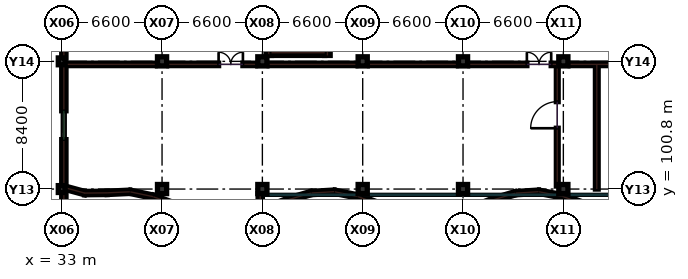
"""IFC4 building model, lengths in metres.
Left out: names, types, materials, properties, quantities, classifications, styles, units other than length and angle.
Written with IfcOpenShell. Run it as: python <this file> out.ifc"""

import sys

from ifc_helpers import new_model, si_unit, direction, frame, frame_2d, origin, origin_2d, place, context, subcontext, project, spatial, rectangle, extrude, element, fill, save


model = new_model("IFC4")
c1 = context("Model", 3, precision=1e-05, world=origin(), true_north=direction((0.0, 1.0)))
c2 = subcontext(c1, "Body", "Model", "MODEL_VIEW")
j1 = project(units=[si_unit("LENGTHUNIT", "METRE"), si_unit("PLANEANGLEUNIT", "RADIAN")], contexts=[c1])
p1 = place(None, origin())
s1 = spatial("IfcSite", under=j1, at=p1, CompositionType="ELEMENT")
p2 = place(p1, origin())
s2 = spatial("IfcBuilding", under=s1, at=p2, CompositionType="ELEMENT")
p3 = place(p2, frame((0.0, 0.0, 14.4)))
s3 = spatial("IfcBuildingStorey", under=s2, at=p3, CompositionType="ELEMENT", Elevation=14.4)
for number, where, z_axis, x_axis in (
    (1, (33.0, 100.8, 0.0), (0.0, 0.0, 1.0), (1.0, 0.0, 0.0)),
    (2, (33.0, 109.2, 0.0), (0.0, 0.0, 1.0), (1.0, 0.0, 0.0)),
):
    element("IfcColumn", number, at=place(p3, frame(where, z_axis=z_axis, x_axis=x_axis)), inside=s3, PredefinedType="COLUMN", context=c2, shape_type="SweptSolid", body=[
        extrude(rectangle(XDim=0.45, YDim=0.45, at=origin_2d()), origin(), (0.0, 0.0, 1.0), 4.2),
    ])
for number, where, z_axis, x_axis in (
    (3, (39.6, 100.8, 0.0), (0.0, 0.0, 1.0), (1.0, 0.0, 0.0)),
    (4, (39.6, 109.2, 0.0), (0.0, 0.0, 1.0), (1.0, 0.0, 0.0)),
    (5, (46.2, 100.8, 0.0), (0.0, 0.0, 1.0), (1.0, 0.0, 0.0)),
    (6, (46.2, 109.2, 0.0), (0.0, 0.0, 1.0), (1.0, 0.0, 0.0)),
    (7, (52.8, 100.8, 0.0), (0.0, 0.0, 1.0), (1.0, 0.0, 0.0)),
    (8, (52.8, 109.2, 0.0), (0.0, 0.0, 1.0), (1.0, 0.0, 0.0)),
    (9, (59.4, 100.8, 0.0), (0.0, 0.0, 1.0), (1.0, 0.0, 0.0)),
    (10, (59.4, 109.2, 0.0), (0.0, 0.0, 1.0), (1.0, 0.0, 0.0)),
    (11, (66.0, 100.8, 0.0), (0.0, 0.0, 1.0), (1.0, 0.0, 0.0)),
    (12, (66.0, 109.2, 0.0), (0.0, 0.0, 1.0), (1.0, 0.0, 0.0)),
):
    element("IfcColumn", number, at=place(p3, frame(where, z_axis=z_axis, x_axis=x_axis)), inside=s3, PredefinedType="COLUMN", context=c2, shape_type="SweptSolid", body=[
        extrude(rectangle(XDim=0.6, YDim=0.6, at=origin_2d()), origin(), (0.0, 0.0, 1.0), 4.2),
    ])
p4 = place(p3, frame((33.32, 109.0, 0.0), z_axis=(0.0, 0.0, 1.0), x_axis=(1.0, 0.0, 0.0)))
e13 = element("IfcWall", 13, at=p4, inside=s3, PredefinedType="PARTITIONING", context=c2, shape_type="SweptSolid", body=[
    extrude(rectangle(XDim=5.83, YDim=0.16, at=frame_2d((2.915, 0.0))), origin(), (0.0, 0.0, 1.0), 3.175),
])
p5 = place(p3, frame((40.05, 109.0, 0.0), z_axis=(0.0, 0.0, 1.0), x_axis=(1.0, 0.0, 0.0)))
e14 = element("IfcWall", 14, at=p5, inside=s3, PredefinedType="PARTITIONING", context=c2, shape_type="SweptSolid", body=[
    extrude(rectangle(XDim=5.7, YDim=0.16, at=frame_2d((2.85, 0.0))), origin(), (0.0, 0.0, 1.0), 3.175),
])
p6 = place(p5, frame((3.27, 0.0, 0.0)))
e15 = element("IfcOpeningElement", 15, at=p6, cuts=e14, PredefinedType="OPENING", context=c2, shape_type="SweptSolid", body=[
    extrude(rectangle(XDim=1.6, YDim=2.2, at=frame_2d((0.8, 1.1))), frame((0.0, 0.09, 0.0), z_axis=(0.0, -1.0, 0.0), x_axis=(1.0, 0.0, 0.0)), (0.0, 0.0, 1.0), 0.18),
])
p7 = place(p3, frame((46.65, 109.0, 0.0), z_axis=(0.0, 0.0, 1.0), x_axis=(1.0, 0.0, 0.0)))
e16 = element("IfcWall", 16, at=p7, inside=s3, PredefinedType="PARTITIONING", context=c2, shape_type="SweptSolid", body=[
    extrude(rectangle(XDim=5.7, YDim=0.16, at=frame_2d((2.85, 0.0))), origin(), (0.0, 0.0, 1.0), 3.175),
])
p8 = place(p3, frame((53.25, 109.0, 0.0), z_axis=(0.0, 0.0, 1.0), x_axis=(1.0, 0.0, 0.0)))
e17 = element("IfcWall", 17, at=p8, inside=s3, PredefinedType="PARTITIONING", context=c2, shape_type="SweptSolid", body=[
    extrude(rectangle(XDim=5.7, YDim=0.16, at=frame_2d((2.85, 0.0))), origin(), (0.0, 0.0, 1.0), 3.175),
])
p9 = place(p3, frame((59.85, 109.0, 0.0), z_axis=(0.0, 0.0, 1.0), x_axis=(1.0, 0.0, 0.0)))
e18 = element("IfcWall", 18, at=p9, inside=s3, PredefinedType="PARTITIONING", context=c2, shape_type="SweptSolid", body=[
    extrude(rectangle(XDim=5.7, YDim=0.16, at=frame_2d((2.85, 0.0))), origin(), (0.0, 0.0, 1.0), 3.175),
])
p10 = place(p9, frame((3.75, 0.0, 0.0)))
e19 = element("IfcOpeningElement", 19, at=p10, cuts=e18, PredefinedType="OPENING", context=c2, shape_type="SweptSolid", body=[
    extrude(rectangle(XDim=1.6, YDim=2.2, at=frame_2d((0.8, 1.1))), frame((0.0, 0.09, 0.0), z_axis=(0.0, -1.0, 0.0), x_axis=(1.0, 0.0, 0.0)), (0.0, 0.0, 1.0), 0.18),
])
p11 = place(p3, frame((66.45, 109.0, 0.0), z_axis=(0.0, 0.0, 1.0), x_axis=(1.0, 0.0, 0.0)))
e20 = element("IfcWall", 20, at=p11, inside=s3, PredefinedType="PARTITIONING", context=c2, shape_type="SweptSolid", body=[
    extrude(rectangle(XDim=5.7, YDim=0.16, at=frame_2d((2.85, 0.0))), origin(), (0.0, 0.0, 1.0), 3.175),
])
p12 = place(p3, frame((68.2, 100.8, 0.0), z_axis=(0.0, 0.0, 1.0), x_axis=(0.0, 1.0, 0.0)))
e21 = element("IfcWall", 21, at=p12, inside=s3, PredefinedType="SOLIDWALL", context=c2, shape_type="SweptSolid", body=[
    extrude(rectangle(XDim=8.2, YDim=0.18, at=frame_2d((4.1, 0.0))), origin(), (0.0, 0.0, 1.0), 3.19),
])
p13 = place(p3, frame((65.6, 101.0, 0.0), z_axis=(0.0, 0.0, 1.0), x_axis=(0.0, 1.0, 0.0)))
e22 = element("IfcWall", 22, at=p13, inside=s3, PredefinedType="PARTITIONING", context=c2, shape_type="SweptSolid", body=[
    extrude(rectangle(XDim=8.0, YDim=0.12, at=frame_2d((4.0, 0.0))), origin(), (0.0, 0.0, 1.0), 3.19),
])
p14 = place(p13, frame((3.8, 0.0, 0.0)))
e23 = element("IfcOpeningElement", 23, at=p14, cuts=e22, PredefinedType="OPENING", context=c2, shape_type="SweptSolid", body=[
    extrude(rectangle(XDim=1.75, YDim=2.3, at=frame_2d((0.875, 1.15))), frame((0.0, 0.07, 0.0), z_axis=(0.0, -1.0, 0.0), x_axis=(1.0, 0.0, 0.0)), (0.0, 0.0, 1.0), 0.14),
])
p15 = place(p3, frame((33.14, 100.58, 0.0), z_axis=(0.0, 0.0, 1.0), x_axis=(0.0, -1.0, 0.0)))
e24 = element("IfcWall", 24, at=p15, inside=s3, PredefinedType="SOLIDWALL", context=c2, shape_type="SweptSolid", body=[
    extrude(rectangle(XDim=7.96, YDim=0.28, at=frame_2d((3.98, 0.0))), origin(), (0.0, 0.0, 1.0), 3.375),
])
p16 = place(p15, frame((3.18, 0.0, 0.95)))
e25 = element("IfcOpeningElement", 25, at=p16, cuts=e24, PredefinedType="OPENING", context=c2, shape_type="SweptSolid", body=[
    extrude(rectangle(XDim=1.6, YDim=1.85, at=frame_2d((0.8, 0.925))), frame((0.0, 0.15, 0.0), z_axis=(0.0, -1.0, 0.0), x_axis=(1.0, 0.0, 0.0)), (0.0, 0.0, 1.0), 0.3),
])
p17 = place(p3, frame((33.14, 108.98, 0.0), z_axis=(0.0, 0.0, 1.0), x_axis=(0.0, -1.0, 0.0)))
e26 = element("IfcWall", 26, at=p17, inside=s3, PredefinedType="SOLIDWALL", context=c2, shape_type="SweptSolid", body=[
    extrude(rectangle(XDim=7.96, YDim=0.28, at=frame_2d((3.98, 0.0))), origin(), (0.0, 0.0, 1.0), 3.225),
])
p18 = place(p17, frame((3.03, 0.0, 0.95)))
e27 = element("IfcOpeningElement", 27, at=p18, cuts=e26, PredefinedType="OPENING", context=c2, shape_type="SweptSolid", body=[
    extrude(rectangle(XDim=1.9, YDim=1.85, at=frame_2d((0.95, 0.925))), frame((0.0, 0.15, 0.0), z_axis=(0.0, -1.0, 0.0), x_axis=(1.0, 0.0, 0.0)), (0.0, 0.0, 1.0), 0.3),
])
p19 = place(p3, frame((33.14, 117.38, 0.0), z_axis=(0.0, 0.0, 1.0), x_axis=(0.0, -1.0, 0.0)))
e28 = element("IfcWall", 28, at=p19, inside=s3, PredefinedType="SOLIDWALL", context=c2, shape_type="SweptSolid", body=[
    extrude(rectangle(XDim=7.96, YDim=0.28, at=frame_2d((3.98, 0.0))), origin(), (0.0, 0.0, 1.0), 3.375),
])
p20 = place(p19, frame((2.88, 0.0, 0.95)))
e29 = element("IfcOpeningElement", 29, at=p20, cuts=e28, PredefinedType="OPENING", context=c2, shape_type="SweptSolid", body=[
    extrude(rectangle(XDim=2.2, YDim=1.85, at=frame_2d((1.1, 0.925))), frame((0.0, 0.15, 0.0), z_axis=(0.0, -1.0, 0.0), x_axis=(1.0, 0.0, 0.0)), (0.0, 0.0, 1.0), 0.3),
])
p21 = place(p3, frame((46.06, 92.62, 0.0), z_axis=(0.0, 0.0, 1.0), x_axis=(0.0, 1.0, 0.0)))
e30 = element("IfcWall", 30, at=p21, inside=s3, PredefinedType="SOLIDWALL", context=c2, shape_type="SweptSolid", body=[
    extrude(rectangle(XDim=7.885, YDim=0.28, at=frame_2d((3.942, 0.0))), origin(), (0.0, 0.0, 1.0), 3.375),
])
p22 = place(p21, frame((3.14, 0.0, 0.95)))
e31 = element("IfcOpeningElement", 31, at=p22, cuts=e30, PredefinedType="OPENING", context=c2, shape_type="SweptSolid", body=[
    extrude(rectangle(XDim=1.6, YDim=1.85, at=frame_2d((0.8, 0.925))), frame((0.0, 0.15, 0.0), z_axis=(0.0, -1.0, 0.0), x_axis=(1.0, 0.0, 0.0)), (0.0, 0.0, 1.0), 0.3),
])
p23 = place(p3, frame((33.035, 100.935, 0.0), z_axis=(0.0, 0.0, 1.0), x_axis=(0.965209799475, -0.26147665861, 0.0)))
e32 = element("IfcWall", 32, at=p23, inside=s3, PredefinedType="SOLIDWALL", context=c2, shape_type="SweptSolid", body=[
    extrude(rectangle(XDim=1.549, YDim=0.22, at=frame_2d((0.774, 0.0))), origin(), (0.0, 0.0, 1.0), 1.45),
])
p24 = place(p3, frame((34.495, 100.535, 0.0), z_axis=(0.0, 0.0, 1.0), x_axis=(0.999948738481, 0.010125236287, 0.0)))
e33 = element("IfcWall", 33, at=p24, inside=s3, PredefinedType="SOLIDWALL", context=c2, shape_type="SweptSolid", body=[
    extrude(rectangle(XDim=1.495, YDim=0.22, at=frame_2d((0.748, 0.0))), origin(), (0.0, 0.0, 1.0), 1.45),
])
p25 = place(p3, frame((35.985, 100.55, 0.0), z_axis=(0.0, 0.0, 1.0), x_axis=(0.998903293592, 0.046821042832, 0.0)))
e34 = element("IfcWall", 34, at=p25, inside=s3, PredefinedType="SOLIDWALL", context=c2, shape_type="SweptSolid", body=[
    extrude(rectangle(XDim=1.497, YDim=0.22, at=frame_2d((0.748, 0.0))), origin(), (0.0, 0.0, 1.0), 1.45),
])
p26 = place(p3, frame((37.515, 100.615, 0.0), z_axis=(0.0, 0.0, 1.0), x_axis=(0.978382774429, -0.206802192203, 0.0)))
e35 = element("IfcWall", 35, at=p26, inside=s3, PredefinedType="SOLIDWALL", context=c2, shape_type="SweptSolid", body=[
    extrude(rectangle(XDim=1.523, YDim=0.22, at=frame_2d((0.761, 0.0))), origin(), (0.0, 0.0, 1.0), 1.45),
])
p27 = place(p3, frame((39.025, 100.295, 0.0), z_axis=(0.0, 0.0, 1.0), x_axis=(0.937506622081, -0.347967431743, 0.0)))
e36 = element("IfcWall", 36, at=p27, inside=s3, PredefinedType="SOLIDWALL", context=c2, shape_type="SweptSolid", body=[
    extrude(rectangle(XDim=1.595, YDim=0.22, at=frame_2d((0.797, 0.0))), origin(), (0.0, 0.0, 1.0), 1.45),
])
p28 = place(p3, frame((46.4, 99.515, 0.0), z_axis=(0.0, 0.0, 1.0), x_axis=(0.932290078611, 0.361711500127, 0.0)))
e37 = element("IfcWall", 37, at=p28, inside=s3, PredefinedType="SOLIDWALL", context=c2, shape_type="SweptSolid", body=[
    extrude(rectangle(XDim=1.604, YDim=0.22, at=frame_2d((0.802, 0.0))), origin(), (0.0, 0.0, 1.0), 1.45),
])
p29 = place(p3, frame((47.905, 100.1, 0.0), z_axis=(0.0, 0.0, 1.0), x_axis=(0.96020523761, 0.279295366354, 0.0)))
e38 = element("IfcWall", 38, at=p29, inside=s3, PredefinedType="SOLIDWALL", context=c2, shape_type="SweptSolid", body=[
    extrude(rectangle(XDim=1.557, YDim=0.22, at=frame_2d((0.778, 0.0))), origin(), (0.0, 0.0, 1.0), 1.45),
])
p30 = place(p3, frame((49.43, 100.54, 0.0), z_axis=(0.0, 0.0, 1.0), x_axis=(0.998378248624, 0.056928663038, 0.0)))
e39 = element("IfcWall", 39, at=p30, inside=s3, PredefinedType="SOLIDWALL", context=c2, shape_type="SweptSolid", body=[
    extrude(rectangle(XDim=1.492, YDim=0.22, at=frame_2d((0.746, 0.0))), origin(), (0.0, 0.0, 1.0), 1.45),
])
p31 = place(p3, frame((50.96, 100.62, 0.0), z_axis=(0.0, 0.0, 1.0), x_axis=(0.979797661114, -0.199991358, 0.0)))
e40 = element("IfcWall", 40, at=p31, inside=s3, PredefinedType="SOLIDWALL", context=c2, shape_type="SweptSolid", body=[
    extrude(rectangle(XDim=1.526, YDim=0.22, at=frame_2d((0.763, 0.0))), origin(), (0.0, 0.0, 1.0), 1.45),
])
p32 = place(p3, frame((52.475, 100.31, 0.0), z_axis=(0.0, 0.0, 1.0), x_axis=(0.938484347718, -0.345321776157, 0.0)))
e41 = element("IfcWall", 41, at=p32, inside=s3, PredefinedType="SOLIDWALL", context=c2, shape_type="SweptSolid", body=[
    extrude(rectangle(XDim=1.593, YDim=0.22, at=frame_2d((0.796, 0.0))), origin(), (0.0, 0.0, 1.0), 1.45),
])
p33 = place(p3, frame((59.85, 99.495, 0.0), z_axis=(0.0, 0.0, 1.0), x_axis=(0.931921542801, 0.362659948247, 0.0)))
e42 = element("IfcWall", 42, at=p33, inside=s3, PredefinedType="SOLIDWALL", context=c2, shape_type="SweptSolid", body=[
    extrude(rectangle(XDim=1.599, YDim=0.22, at=frame_2d((0.799, 0.0))), origin(), (0.0, 0.0, 1.0), 1.45),
])
p34 = place(p3, frame((61.35, 100.08, 0.0), z_axis=(0.0, 0.0, 1.0), x_axis=(0.958465833524, 0.285207373621, 0.0)))
e43 = element("IfcWall", 43, at=p34, inside=s3, PredefinedType="SOLIDWALL", context=c2, shape_type="SweptSolid", body=[
    extrude(rectangle(XDim=1.56, YDim=0.22, at=frame_2d((0.78, 0.0))), origin(), (0.0, 0.0, 1.0), 1.45),
])
p35 = place(p3, frame((62.875, 100.53, 0.0), z_axis=(0.0, 0.0, 1.0), x_axis=(0.99798865288, 0.063392812863, 0.0)))
e44 = element("IfcWall", 44, at=p35, inside=s3, PredefinedType="SOLIDWALL", context=c2, shape_type="SweptSolid", body=[
    extrude(rectangle(XDim=1.498, YDim=0.22, at=frame_2d((0.749, 0.0))), origin(), (0.0, 0.0, 1.0), 1.45),
])
p36 = place(p3, frame((64.405, 100.62, 0.0), z_axis=(0.0, 0.0, 1.0), x_axis=(0.981692910036, -0.190470549914, 0.0)))
e45 = element("IfcWall", 45, at=p36, inside=s3, PredefinedType="SOLIDWALL", context=c2, shape_type="SweptSolid", body=[
    extrude(rectangle(XDim=1.523, YDim=0.22, at=frame_2d((0.761, 0.0))), origin(), (0.0, 0.0, 1.0), 1.45),
])
p37 = place(p3, frame((65.925, 100.325, 0.0), z_axis=(0.0, 0.0, 1.0), x_axis=(0.940508911561, -0.339769020476, 0.0)))
e46 = element("IfcWall", 46, at=p37, inside=s3, PredefinedType="SOLIDWALL", context=c2, shape_type="SweptSolid", body=[
    extrude(rectangle(XDim=1.589, YDim=0.22, at=frame_2d((0.795, 0.0))), origin(), (0.0, 0.0, 1.0), 1.45),
])
p38 = place(p3, frame((46.62, 109.59, 0.0), z_axis=(0.0, 0.0, 1.0), x_axis=(0.0, 1.0, 0.0)))
e47 = element("IfcWall", 47, at=p38, inside=s3, PredefinedType="SHEAR", context=c2, shape_type="SweptSolid", body=[
    extrude(rectangle(XDim=7.84, YDim=0.36, at=frame_2d((3.92, 0.0))), origin(), (0.0, 0.0, 1.0), 3.94),
])
p39 = place(p3, frame((50.48, 109.59, 0.0), z_axis=(0.0, 0.0, 1.0), x_axis=(0.0, 1.0, 0.0)))
e48 = element("IfcWall", 48, at=p39, inside=s3, PredefinedType="SHEAR", context=c2, shape_type="SweptSolid", body=[
    extrude(rectangle(XDim=7.84, YDim=0.36, at=frame_2d((3.92, 0.0))), origin(), (0.0, 0.0, 1.0), 3.94),
])
p40 = place(p39, frame((0.45, 0.0, 0.0)))
e49 = element("IfcOpeningElement", 49, at=p40, cuts=e48, PredefinedType="OPENING", context=c2, shape_type="SweptSolid", body=[
    extrude(rectangle(XDim=1.25, YDim=2.15, at=frame_2d((0.625, 1.075))), frame((0.0, 0.19, 0.0), z_axis=(0.0, -1.0, 0.0), x_axis=(1.0, 0.0, 0.0)), (0.0, 0.0, 1.0), 0.38),
])
p41 = place(p3, frame((46.8, 109.77, 0.0), z_axis=(0.0, 0.0, 1.0), x_axis=(1.0, 0.0, 0.0)))
e50 = element("IfcWall", 50, at=p41, inside=s3, PredefinedType="SHEAR", context=c2, shape_type="SweptSolid", body=[
    extrude(rectangle(XDim=3.5, YDim=0.36, at=frame_2d((1.75, 0.0))), origin(), (0.0, 0.0, 1.0), 3.94),
])
p42 = place(p6, origin())
e51 = element("IfcDoor", 51, at=p42, inside=s3, OperationType="DOUBLE_DOOR_SINGLE_SWING", PredefinedType="DOOR", context=c2, shape_type="SweptSolid", body=[
    extrude(rectangle(XDim=1.6, YDim=2.2, at=frame_2d((0.8, 1.1))), frame((0.0, 0.025, 0.0), z_axis=(0.0, -1.0, 0.0), x_axis=(1.0, 0.0, 0.0)), (0.0, 0.0, 1.0), 0.05),
])
fill(e15, e51)
p43 = place(p10, origin())
e52 = element("IfcDoor", 52, at=p43, inside=s3, OperationType="DOUBLE_DOOR_SINGLE_SWING", PredefinedType="DOOR", context=c2, shape_type="SweptSolid", body=[
    extrude(rectangle(XDim=1.6, YDim=2.2, at=frame_2d((0.8, 1.1))), frame((0.0, 0.025, 0.0), z_axis=(0.0, -1.0, 0.0), x_axis=(1.0, 0.0, 0.0)), (0.0, 0.0, 1.0), 0.05),
])
fill(e19, e52)
p44 = place(p14, origin())
e53 = element("IfcDoor", 53, at=p44, inside=s3, OperationType="SINGLE_SWING_LEFT", PredefinedType="DOOR", context=c2, shape_type="SweptSolid", body=[
    extrude(rectangle(XDim=1.75, YDim=2.3, at=frame_2d((0.875, 1.15))), frame((0.0, 0.025, 0.0), z_axis=(0.0, -1.0, 0.0), x_axis=(1.0, 0.0, 0.0)), (0.0, 0.0, 1.0), 0.05),
])
fill(e23, e53)
p45 = place(p18, origin())
e54 = element("IfcWindow", 54, at=p45, inside=s3, PartitioningType="SINGLE_PANEL", PredefinedType="WINDOW", context=c2, shape_type="SweptSolid", body=[
    extrude(rectangle(XDim=1.9, YDim=1.85, at=frame_2d((0.95, 0.925))), frame((0.0, 0.03, 0.0), z_axis=(0.0, -1.0, 0.0), x_axis=(1.0, 0.0, 0.0)), (0.0, 0.0, 1.0), 0.06),
])
fill(e27, e54)
save(model, sys.argv[1])
